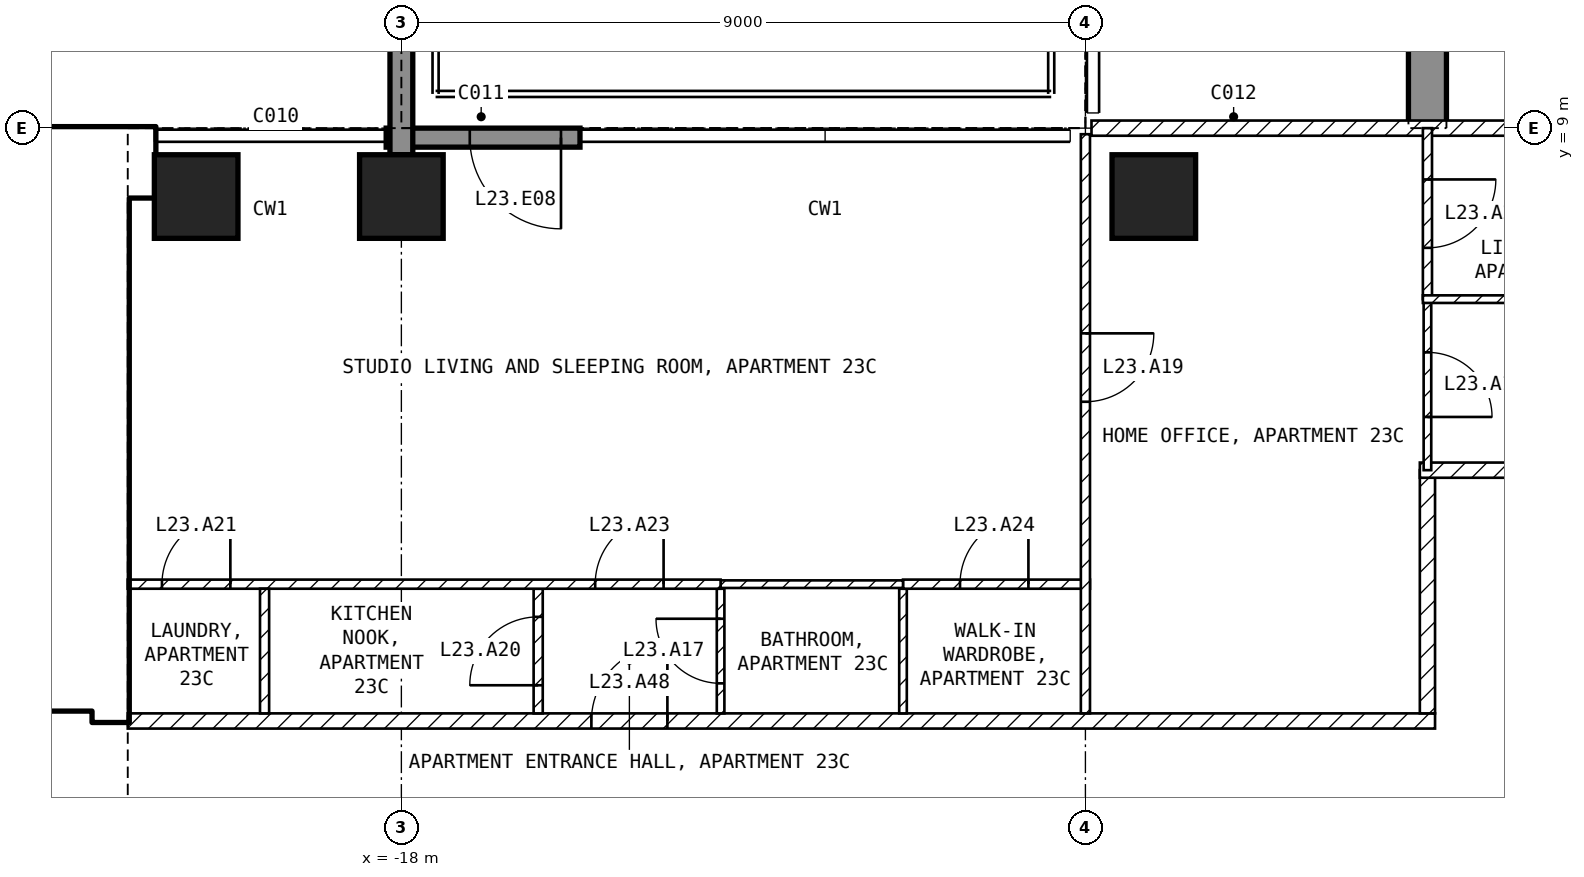
"""IFC4 building model, lengths in metres.
Left out: names, types, materials, properties, quantities, classifications, styles, units other than length and angle.
Written with IfcOpenShell. Run it as: python <this file> out.ifc"""

import sys

from ifc_helpers import new_model, si_unit, direction, frame, frame_2d, origin, origin_2d, place, context, subcontext, project, spatial, polyline, rectangle, outline, extrude, element, fill, save


model = new_model("IFC4")
c1 = context("Model", 3, precision=1e-05, world=origin(), true_north=direction((0.0, 1.0)))
c2 = subcontext(c1, "Body", "Model", "MODEL_VIEW")
j1 = project(units=[si_unit("LENGTHUNIT", "METRE"), si_unit("PLANEANGLEUNIT", "RADIAN")], contexts=[c1])
p1 = place(None, origin())
s1 = spatial("IfcSite", under=j1, at=p1, CompositionType="ELEMENT")
p2 = place(p1, origin())
s2 = spatial("IfcBuilding", under=s1, at=p2, CompositionType="ELEMENT")
p3 = place(p2, frame((0.0, 0.0, 102.4)))
s3 = spatial("IfcBuildingStorey", under=s2, at=p3, CompositionType="ELEMENT", Elevation=102.4)
for number, where, z_axis, x_axis in (
    (1, (-20.7, 8.1, -0.25), (0.0, 0.0, 1.0), (1.0, 0.0, 0.0)),
    (2, (-18.0, 8.1, -0.25), (0.0, 0.0, 1.0), (1.0, 0.0, 0.0)),
    (3, (-8.1, 8.1, -0.25), (0.0, 0.0, 1.0), (1.0, 0.0, 0.0)),
):
    element("IfcColumn", number, at=place(p3, frame(where, z_axis=z_axis, x_axis=x_axis)), inside=s3, PredefinedType="COLUMN", context=c2, shape_type="SweptSolid", body=[
        extrude(rectangle(XDim=1.1, YDim=1.1, at=origin_2d()), origin(), (0.0, 0.0, 1.0), 3.5),
    ])
p4 = place(p3, frame((-4.75, 9.0, -0.25), z_axis=(1.0, 0.0, 0.0), x_axis=(0.0, 1.0, 0.0)))
e4 = element("IfcWall", 4, at=p4, inside=s3, PredefinedType="SHEAR", context=c2, shape_type="SweptSolid", body=[
    extrude(outline(polyline([(0.0, 0.0), (2.1, 0.0), (2.1, 2.65), (4.5, 2.65), (4.5, 0.0), (9.9, 0.0), (9.9, 2.65), (12.3, 2.65), (12.3, 0.0), (16.55, 0.0), (16.55, 3.5), (0.0, 3.5), (0.0, 0.0)])), origin(), (0.0, 0.0, 1.0), 0.5),
])
p5 = place(p3, frame((-15.65, 8.875, 0.0), z_axis=(0.0, 0.0, 1.0), x_axis=(-1.0, 0.0, 0.0)))
e5 = element("IfcWall", 5, at=p5, inside=s3, PredefinedType="SOLIDWALL", context=c2, shape_type="SweptSolid", body=[
    extrude(rectangle(XDim=2.55, YDim=0.25, at=frame_2d((1.275, 0.0))), origin(), (0.0, 0.0, 1.0), 3.25),
])
p6 = place(p5, frame((0.25, 0.0, 0.0)))
e6 = element("IfcOpeningElement", 6, at=p6, cuts=e5, PredefinedType="OPENING", context=c2, shape_type="SweptSolid", body=[
    extrude(rectangle(XDim=1.2, YDim=2.4, at=frame_2d((0.6, 1.2))), frame((0.0, 0.135, 0.0), z_axis=(0.0, -1.0, 0.0), x_axis=(1.0, 0.0, 0.0)), (0.0, 0.0, 1.0), 0.27),
])
p7 = place(p3, frame((-18.0, 8.65, 0.0), z_axis=(0.0, 0.0, 1.0), x_axis=(0.0, 1.0, 0.0)))
e7 = element("IfcWall", 7, at=p7, inside=s3, PredefinedType="SOLIDWALL", context=c2, shape_type="SweptSolid", body=[
    extrude(rectangle(XDim=3.09, YDim=0.3, at=frame_2d((1.545, 0.0))), origin(), (0.0, 0.0, 1.0), 3.25),
])
p8 = place(p3, frame((-29.45, 8.55, 0.0), z_axis=(0.0, 0.0, 1.0), x_axis=(1.0, 0.0, 0.0)))
e8 = element("IfcWall", 8, at=p8, inside=s3, PredefinedType="SHEAR", context=c2, shape_type="SweptSolid", body=[
    extrude(rectangle(XDim=8.2, YDim=0.9, at=frame_2d((4.1, 0.0))), origin(), (0.0, 0.0, 1.0), 3.25),
])
p9 = place(p3, frame((-21.825, 1.2, 0.0), z_axis=(0.0, 0.0, 1.0), x_axis=(0.0, 1.0, 0.0)))
e9 = element("IfcWall", 9, at=p9, inside=s3, PredefinedType="SHEAR", context=c2, shape_type="SweptSolid", body=[
    extrude(rectangle(XDim=6.9, YDim=0.45, at=frame_2d((3.45, 0.0))), origin(), (0.0, 0.0, 1.0), 3.25),
])
p10 = place(p3, frame((-33.05, 1.45, 0.0), z_axis=(0.0, 0.0, 1.0), x_axis=(1.0, 0.0, 0.0)))
e10 = element("IfcWall", 10, at=p10, inside=s3, PredefinedType="SOLIDWALL", context=c2, shape_type="SweptSolid", body=[
    extrude(rectangle(XDim=11.0, YDim=0.2, at=frame_2d((5.5, 0.0))), origin(), (0.0, 0.0, 1.0), 3.25),
])
p11 = place(p10, frame((9.25, 0.0, 0.0)))
e11 = element("IfcOpeningElement", 11, at=p11, cuts=e10, PredefinedType="OPENING", context=c2, shape_type="SweptSolid", body=[
    extrude(rectangle(XDim=1.0, YDim=2.1, at=frame_2d((0.5, 1.05))), frame((0.0, 0.11, 0.0), z_axis=(0.0, -1.0, 0.0), x_axis=(1.0, 0.0, 0.0)), (0.0, 0.0, 1.0), 0.22),
])
p12 = place(p10, frame((6.75, 0.0, 0.0)))
e12 = element("IfcOpeningElement", 12, at=p12, cuts=e10, PredefinedType="OPENING", context=c2, shape_type="SweptSolid", body=[
    extrude(rectangle(XDim=1.0, YDim=2.1, at=frame_2d((0.5, 1.05))), frame((0.0, 0.11, 0.0), z_axis=(0.0, -1.0, 0.0), x_axis=(1.0, 0.0, 0.0)), (0.0, 0.0, 1.0), 0.22),
])
p13 = place(p10, frame((1.025, 0.0, 0.0)))
e13 = element("IfcOpeningElement", 13, at=p13, cuts=e10, PredefinedType="OPENING", context=c2, shape_type="SweptSolid", body=[
    extrude(rectangle(XDim=0.9, YDim=2.1, at=frame_2d((0.45, 1.05))), frame((0.0, 0.11, 0.0), z_axis=(0.0, -1.0, 0.0), x_axis=(1.0, 0.0, 0.0)), (0.0, 0.0, 1.0), 0.22),
])
p14 = place(p3, frame((-28.35, 5.15, 0.0), z_axis=(0.0, 0.0, 1.0), x_axis=(1.0, 0.0, 0.0)))
e14 = element("IfcWall", 14, at=p14, inside=s3, PredefinedType="SOLIDWALL", context=c2, shape_type="SweptSolid", body=[
    extrude(rectangle(XDim=6.3, YDim=0.2, at=frame_2d((3.15, 0.0))), origin(), (0.0, 0.0, 1.0), 3.25),
])
p15 = place(p14, frame((5.1, 0.0, 0.0)))
e15 = element("IfcOpeningElement", 15, at=p15, cuts=e14, PredefinedType="OPENING", context=c2, shape_type="SweptSolid", body=[
    extrude(rectangle(XDim=1.0, YDim=2.1, at=frame_2d((0.5, 1.05))), frame((0.0, 0.11, 0.0), z_axis=(0.0, -1.0, 0.0), x_axis=(1.0, 0.0, 0.0)), (0.0, 0.0, 1.0), 0.22),
])
p16 = place(p3, frame((-21.6, 1.2, 0.0), z_axis=(0.0, 0.0, 1.0), x_axis=(1.0, 0.0, 0.0)))
e16 = element("IfcWall", 16, at=p16, inside=s3, PredefinedType="PARTITIONING", context=c2, shape_type="SweptSolid", body=[
    extrude(rectangle(XDim=17.2, YDim=0.2, at=frame_2d((8.6, 0.0))), origin(), (0.0, 0.0, 1.0), 3.25),
])
p17 = place(p16, frame((6.1, 0.0, 0.0)))
e17 = element("IfcOpeningElement", 17, at=p17, cuts=e16, PredefinedType="OPENING", context=c2, shape_type="SweptSolid", body=[
    extrude(rectangle(XDim=1.0, YDim=2.1, at=frame_2d((0.5, 1.05))), frame((0.0, 0.11, 0.0), z_axis=(0.0, -1.0, 0.0), x_axis=(1.0, 0.0, 0.0)), (0.0, 0.0, 1.0), 0.22),
])
p18 = place(p3, frame((-4.5, 1.3, 0.0), z_axis=(0.0, 0.0, 1.0), x_axis=(0.0, 1.0, 0.0)))
e18 = element("IfcWall", 18, at=p18, inside=s3, PredefinedType="PARTITIONING", context=c2, shape_type="SweptSolid", body=[
    extrude(rectangle(XDim=3.2, YDim=0.2, at=frame_2d((1.6, 0.0))), origin(), (0.0, 0.0, 1.0), 3.25),
])
p19 = place(p3, frame((-4.6, 4.5, 0.0), z_axis=(0.0, 0.0, 1.0), x_axis=(1.0, 0.0, 0.0)))
e19 = element("IfcWall", 19, at=p19, inside=s3, PredefinedType="PARTITIONING", context=c2, shape_type="SweptSolid", body=[
    extrude(rectangle(XDim=3.5, YDim=0.2, at=frame_2d((1.75, 0.0))), origin(), (0.0, 0.0, 1.0), 3.25),
])
p20 = place(p3, frame((-8.92, 9.0, 0.0), z_axis=(0.0, 0.0, 1.0), x_axis=(1.0, 0.0, 0.0)))
e20 = element("IfcWall", 20, at=p20, inside=s3, PredefinedType="PARTITIONING", context=c2, shape_type="SweptSolid", body=[
    extrude(rectangle(XDim=17.84, YDim=0.2, at=frame_2d((8.92, 0.0))), origin(), (0.0, 0.0, 1.0), 3.25),
])
p21 = place(p20, frame((8.42, 0.0, 0.0)))
e21 = element("IfcOpeningElement", 21, at=p21, cuts=e20, PredefinedType="OPENING", context=c2, shape_type="SweptSolid", body=[
    extrude(rectangle(XDim=1.0, YDim=2.1, at=frame_2d((0.5, 1.05))), frame((0.0, 0.11, 0.0), z_axis=(0.0, -1.0, 0.0), x_axis=(1.0, 0.0, 0.0)), (0.0, 0.0, 1.0), 0.22),
])
p22 = place(p3, frame((-11.4, 1.3, 0.0), z_axis=(0.0, 0.0, 1.0), x_axis=(0.0, 1.0, 0.0)))
e22 = element("IfcWall", 22, at=p22, inside=s3, PredefinedType="PARTITIONING", context=c2, shape_type="SweptSolid", body=[
    extrude(rectangle(XDim=1.64, YDim=0.1, at=frame_2d((0.82, 0.0))), origin(), (0.0, 0.0, 1.0), 3.25),
])
p23 = place(p3, frame((-11.4, 3.0, 0.0), z_axis=(0.0, 0.0, 1.0), x_axis=(1.0, 0.0, 0.0)))
e23 = element("IfcWall", 23, at=p23, inside=s3, PredefinedType="PARTITIONING", context=c2, shape_type="SweptSolid", body=[
    extrude(rectangle(XDim=2.46, YDim=0.12, at=frame_2d((1.23, 0.0))), origin(), (0.0, 0.0, 1.0), 3.25),
])
p24 = place(p23, frame((0.75, 0.0, 0.0)))
e24 = element("IfcOpeningElement", 24, at=p24, cuts=e23, PredefinedType="OPENING", context=c2, shape_type="SweptSolid", body=[
    extrude(rectangle(XDim=0.9, YDim=2.1, at=frame_2d((0.45, 1.05))), frame((0.0, 0.07, 0.0), z_axis=(0.0, -1.0, 0.0), x_axis=(1.0, 0.0, 0.0)), (0.0, 0.0, 1.0), 0.14),
])
p25 = place(p3, frame((-9.0, 8.92, 0.0), z_axis=(0.0, 0.0, 1.0), x_axis=(0.0, -1.0, 0.0)))
e25 = element("IfcWall", 25, at=p25, inside=s3, PredefinedType="PARTITIONING", context=c2, shape_type="SweptSolid", body=[
    extrude(rectangle(XDim=7.62, YDim=0.12, at=frame_2d((3.81, 0.0))), origin(), (0.0, 0.0, 1.0), 3.25),
])
p26 = place(p25, frame((2.62, 0.0, 0.0)))
e26 = element("IfcOpeningElement", 26, at=p26, cuts=e25, PredefinedType="OPENING", context=c2, shape_type="SweptSolid", body=[
    extrude(rectangle(XDim=0.9, YDim=2.1, at=frame_2d((0.45, 1.05))), frame((0.0, 0.07, 0.0), z_axis=(0.0, -1.0, 0.0), x_axis=(1.0, 0.0, 0.0)), (0.0, 0.0, 1.0), 0.14),
])
p27 = place(p3, frame((-13.8, 1.3, 0.0), z_axis=(0.0, 0.0, 1.0), x_axis=(0.0, 1.0, 0.0)))
e27 = element("IfcWall", 27, at=p27, inside=s3, PredefinedType="PARTITIONING", context=c2, shape_type="SweptSolid", body=[
    extrude(rectangle(XDim=1.64, YDim=0.1, at=frame_2d((0.82, 0.0))), origin(), (0.0, 0.0, 1.0), 3.25),
])
p28 = place(p27, frame((0.395, 0.0, 0.0)))
e28 = element("IfcOpeningElement", 28, at=p28, cuts=e27, PredefinedType="OPENING", context=c2, shape_type="SweptSolid", body=[
    extrude(rectangle(XDim=0.85, YDim=2.1, at=frame_2d((0.425, 1.05))), frame((0.0, 0.06, 0.0), z_axis=(0.0, -1.0, 0.0), x_axis=(1.0, 0.0, 0.0)), (0.0, 0.0, 1.0), 0.12),
])
p29 = place(p3, frame((-13.8, 3.0, 0.0), z_axis=(0.0, 0.0, 1.0), x_axis=(1.0, 0.0, 0.0)))
e29 = element("IfcWall", 29, at=p29, inside=s3, PredefinedType="PARTITIONING", context=c2, shape_type="SweptSolid", body=[
    extrude(rectangle(XDim=2.4, YDim=0.1, at=frame_2d((1.2, 0.0))), origin(), (0.0, 0.0, 1.0), 3.25),
])
p30 = place(p3, frame((-16.2, 1.3, 0.0), z_axis=(0.0, 0.0, 1.0), x_axis=(0.0, 1.0, 0.0)))
e30 = element("IfcWall", 30, at=p30, inside=s3, PredefinedType="PARTITIONING", context=c2, shape_type="SweptSolid", body=[
    extrude(rectangle(XDim=1.64, YDim=0.12, at=frame_2d((0.82, 0.0))), origin(), (0.0, 0.0, 1.0), 3.25),
])
p31 = place(p30, frame((0.37, 0.0, 0.0)))
e31 = element("IfcOpeningElement", 31, at=p31, cuts=e30, PredefinedType="OPENING", context=c2, shape_type="SweptSolid", body=[
    extrude(rectangle(XDim=0.9, YDim=2.1, at=frame_2d((0.45, 1.05))), frame((0.0, 0.07, 0.0), z_axis=(0.0, -1.0, 0.0), x_axis=(1.0, 0.0, 0.0)), (0.0, 0.0, 1.0), 0.14),
])
p32 = place(p3, frame((-21.6, 3.0, 0.0), z_axis=(0.0, 0.0, 1.0), x_axis=(1.0, 0.0, 0.0)))
e32 = element("IfcWall", 32, at=p32, inside=s3, PredefinedType="PARTITIONING", context=c2, shape_type="SweptSolid", body=[
    extrude(rectangle(XDim=7.8, YDim=0.12, at=frame_2d((3.9, 0.0))), origin(), (0.0, 0.0, 1.0), 3.25),
])
p33 = place(p32, frame((0.45, 0.0, 0.0)))
e33 = element("IfcOpeningElement", 33, at=p33, cuts=e32, PredefinedType="OPENING", context=c2, shape_type="SweptSolid", body=[
    extrude(rectangle(XDim=0.9, YDim=2.1, at=frame_2d((0.45, 1.05))), frame((0.0, 0.07, 0.0), z_axis=(0.0, -1.0, 0.0), x_axis=(1.0, 0.0, 0.0)), (0.0, 0.0, 1.0), 0.14),
])
p34 = place(p32, frame((6.15, 0.0, 0.0)))
e34 = element("IfcOpeningElement", 34, at=p34, cuts=e32, PredefinedType="OPENING", context=c2, shape_type="SweptSolid", body=[
    extrude(rectangle(XDim=0.9, YDim=2.1, at=frame_2d((0.45, 1.05))), frame((0.0, 0.07, 0.0), z_axis=(0.0, -1.0, 0.0), x_axis=(1.0, 0.0, 0.0)), (0.0, 0.0, 1.0), 0.14),
])
p35 = place(p3, frame((-19.8, 1.3, 0.0), z_axis=(0.0, 0.0, 1.0), x_axis=(0.0, 1.0, 0.0)))
e35 = element("IfcWall", 35, at=p35, inside=s3, PredefinedType="PARTITIONING", context=c2, shape_type="SweptSolid", body=[
    extrude(rectangle(XDim=1.64, YDim=0.12, at=frame_2d((0.82, 0.0))), origin(), (0.0, 0.0, 1.0), 3.25),
])
p36 = place(p3, frame((-4.5, 6.75, 0.0), z_axis=(0.0, 0.0, 1.0), x_axis=(0.0, -1.0, 0.0)))
e36 = element("IfcWall", 36, at=p36, inside=s3, PredefinedType="PARTITIONING", context=c2, shape_type="SweptSolid", body=[
    extrude(rectangle(XDim=2.25, YDim=0.1, at=frame_2d((1.125, 0.0))), origin(), (0.0, 0.0, 1.0), 3.25),
])
p37 = place(p36, frame((0.7, 0.0, 0.0)))
e37 = element("IfcOpeningElement", 37, at=p37, cuts=e36, PredefinedType="OPENING", context=c2, shape_type="SweptSolid", body=[
    extrude(rectangle(XDim=0.85, YDim=2.1, at=frame_2d((0.425, 1.05))), frame((0.0, 0.06, 0.0), z_axis=(0.0, -1.0, 0.0), x_axis=(1.0, 0.0, 0.0)), (0.0, 0.0, 1.0), 0.12),
])
p38 = place(p3, frame((-4.5, 9.0, 0.0), z_axis=(0.0, 0.0, 1.0), x_axis=(0.0, -1.0, 0.0)))
e38 = element("IfcWall", 38, at=p38, inside=s3, PredefinedType="PARTITIONING", context=c2, shape_type="SweptSolid", body=[
    extrude(rectangle(XDim=2.25, YDim=0.12, at=frame_2d((1.125, 0.0))), origin(), (0.0, 0.0, 1.0), 3.25),
])
p39 = place(p38, frame((0.675, 0.0, 0.0)))
e39 = element("IfcOpeningElement", 39, at=p39, cuts=e38, PredefinedType="OPENING", context=c2, shape_type="SweptSolid", body=[
    extrude(rectangle(XDim=0.9, YDim=2.1, at=frame_2d((0.45, 1.05))), frame((0.0, 0.07, 0.0), z_axis=(0.0, -1.0, 0.0), x_axis=(1.0, 0.0, 0.0)), (0.0, 0.0, 1.0), 0.14),
])
p40 = place(p3, frame((-4.56, 6.75, 0.0), z_axis=(0.0, 0.0, 1.0), x_axis=(1.0, 0.0, 0.0)))
e40 = element("IfcWall", 40, at=p40, inside=s3, PredefinedType="PARTITIONING", context=c2, shape_type="SweptSolid", body=[
    extrude(rectangle(XDim=3.46, YDim=0.1, at=frame_2d((1.73, 0.0))), origin(), (0.0, 0.0, 1.0), 3.25),
])
p41 = place(p6, origin())
e41 = element("IfcDoor", 41, at=p41, inside=s3, OperationType="SINGLE_SWING_LEFT", PredefinedType="DOOR", context=c2, shape_type="SweptSolid", body=[
    extrude(rectangle(XDim=1.2, YDim=2.4, at=frame_2d((0.6, 1.2))), frame((0.0, 0.025, 0.0), z_axis=(0.0, -1.0, 0.0), x_axis=(1.0, 0.0, 0.0)), (0.0, 0.0, 1.0), 0.05),
])
fill(e6, e41)
p42 = place(p15, origin())
e42 = element("IfcDoor", 42, at=p42, inside=s3, OperationType="SINGLE_SWING_LEFT", PredefinedType="DOOR", context=c2, shape_type="SweptSolid", body=[
    extrude(rectangle(XDim=1.0, YDim=2.1, at=frame_2d((0.5, 1.05))), frame((0.0, 0.025, 0.0), z_axis=(0.0, -1.0, 0.0), x_axis=(1.0, 0.0, 0.0)), (0.0, 0.0, 1.0), 0.05),
])
fill(e15, e42)
p43 = place(p28, origin())
e43 = element("IfcDoor", 43, at=p43, inside=s3, OperationType="SINGLE_SWING_RIGHT", PredefinedType="DOOR", context=c2, shape_type="SweptSolid", body=[
    extrude(rectangle(XDim=0.85, YDim=2.1, at=frame_2d((0.425, 1.05))), frame((0.0, 0.025, 0.0), z_axis=(0.0, -1.0, 0.0), x_axis=(1.0, 0.0, 0.0)), (0.0, 0.0, 1.0), 0.05),
])
fill(e28, e43)
p44 = place(p37, origin())
e44 = element("IfcDoor", 44, at=p44, inside=s3, OperationType="SINGLE_SWING_RIGHT", PredefinedType="DOOR", context=c2, shape_type="SweptSolid", body=[
    extrude(rectangle(XDim=0.85, YDim=2.1, at=frame_2d((0.425, 1.05))), frame((0.0, 0.025, 0.0), z_axis=(0.0, -1.0, 0.0), x_axis=(1.0, 0.0, 0.0)), (0.0, 0.0, 1.0), 0.05),
])
fill(e37, e44)
p45 = place(p26, origin())
e45 = element("IfcDoor", 45, at=p45, inside=s3, OperationType="SINGLE_SWING_LEFT", PredefinedType="DOOR", context=c2, shape_type="SweptSolid", body=[
    extrude(rectangle(XDim=0.9, YDim=2.1, at=frame_2d((0.45, 1.05))), frame((0.0, 0.025, 0.0), z_axis=(0.0, -1.0, 0.0), x_axis=(1.0, 0.0, 0.0)), (0.0, 0.0, 1.0), 0.05),
])
fill(e26, e45)
p46 = place(p31, origin())
e46 = element("IfcDoor", 46, at=p46, inside=s3, OperationType="SINGLE_SWING_LEFT", PredefinedType="DOOR", context=c2, shape_type="SweptSolid", body=[
    extrude(rectangle(XDim=0.9, YDim=2.1, at=frame_2d((0.45, 1.05))), frame((0.0, 0.025, 0.0), z_axis=(0.0, -1.0, 0.0), x_axis=(1.0, 0.0, 0.0)), (0.0, 0.0, 1.0), 0.05),
])
fill(e31, e46)
p47 = place(p33, origin())
e47 = element("IfcDoor", 47, at=p47, inside=s3, OperationType="SINGLE_SWING_RIGHT", PredefinedType="DOOR", context=c2, shape_type="SweptSolid", body=[
    extrude(rectangle(XDim=0.9, YDim=2.1, at=frame_2d((0.45, 1.05))), frame((0.0, 0.025, 0.0), z_axis=(0.0, -1.0, 0.0), x_axis=(1.0, 0.0, 0.0)), (0.0, 0.0, 1.0), 0.05),
])
fill(e33, e47)
p48 = place(p39, origin())
e48 = element("IfcDoor", 48, at=p48, inside=s3, OperationType="SINGLE_SWING_LEFT", PredefinedType="DOOR", context=c2, shape_type="SweptSolid", body=[
    extrude(rectangle(XDim=0.9, YDim=2.1, at=frame_2d((0.45, 1.05))), frame((0.0, 0.025, 0.0), z_axis=(0.0, -1.0, 0.0), x_axis=(1.0, 0.0, 0.0)), (0.0, 0.0, 1.0), 0.05),
])
fill(e39, e48)
p49 = place(p34, origin())
e49 = element("IfcDoor", 49, at=p49, inside=s3, OperationType="SINGLE_SWING_RIGHT", PredefinedType="DOOR", context=c2, shape_type="SweptSolid", body=[
    extrude(rectangle(XDim=0.9, YDim=2.1, at=frame_2d((0.45, 1.05))), frame((0.0, 0.025, 0.0), z_axis=(0.0, -1.0, 0.0), x_axis=(1.0, 0.0, 0.0)), (0.0, 0.0, 1.0), 0.05),
])
fill(e34, e49)
p50 = place(p24, origin())
e50 = element("IfcDoor", 50, at=p50, inside=s3, OperationType="SINGLE_SWING_RIGHT", PredefinedType="DOOR", context=c2, shape_type="SweptSolid", body=[
    extrude(rectangle(XDim=0.9, YDim=2.1, at=frame_2d((0.45, 1.05))), frame((0.0, 0.025, 0.0), z_axis=(0.0, -1.0, 0.0), x_axis=(1.0, 0.0, 0.0)), (0.0, 0.0, 1.0), 0.05),
])
fill(e24, e50)
p51 = place(p17, origin())
e51 = element("IfcDoor", 51, at=p51, inside=s3, OperationType="SINGLE_SWING_RIGHT", PredefinedType="DOOR", context=c2, shape_type="SweptSolid", body=[
    extrude(rectangle(XDim=1.0, YDim=2.1, at=frame_2d((0.5, 1.05))), frame((0.0, 0.025, 0.0), z_axis=(0.0, -1.0, 0.0), x_axis=(1.0, 0.0, 0.0)), (0.0, 0.0, 1.0), 0.05),
])
fill(e17, e51)
save(model, sys.argv[1])
